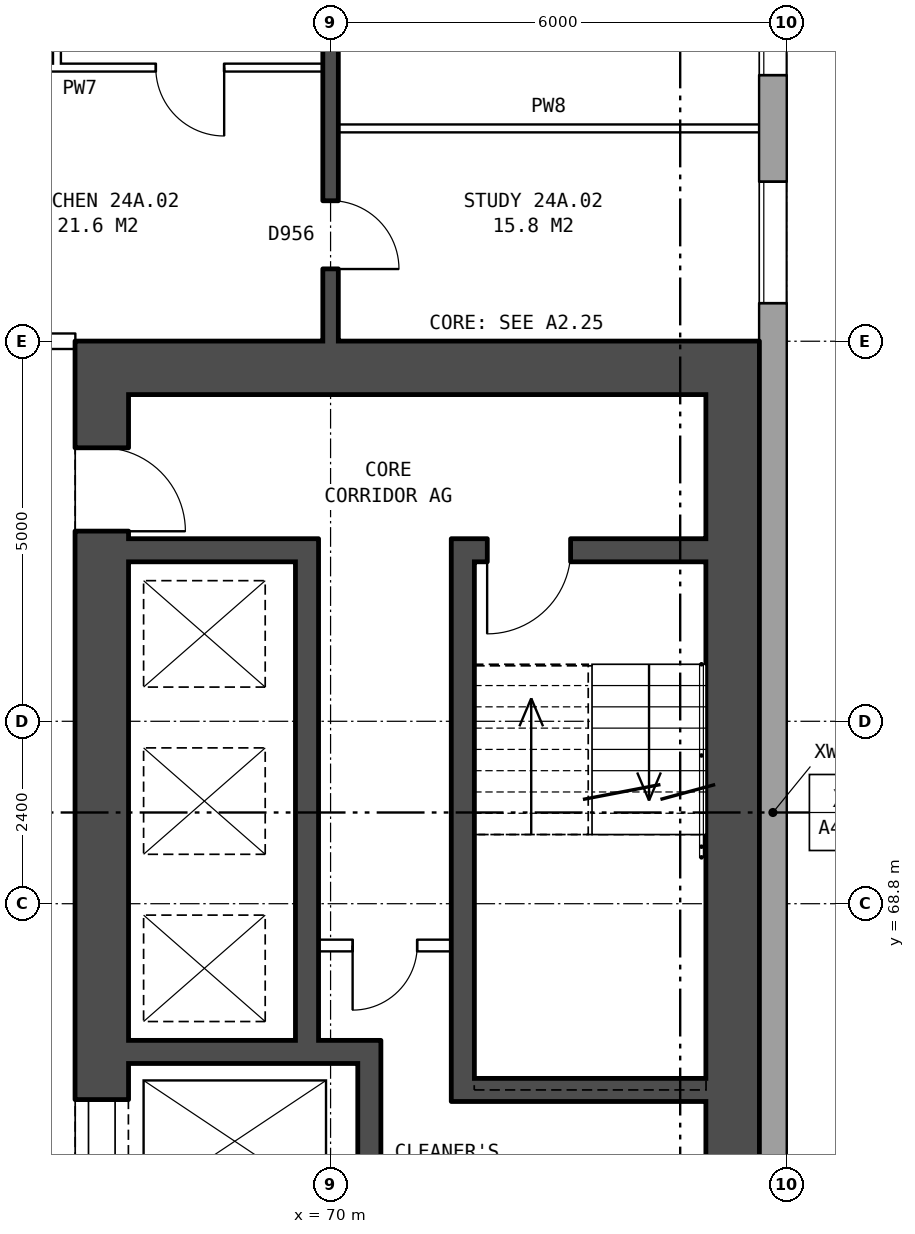
"""IFC4 building model, lengths in metres.
Left out: names, types, materials, properties, quantities, classifications, styles, units other than length and angle.
Written with IfcOpenShell. Run it as: python <this file> out.ifc"""

import sys

from ifc_helpers import new_model, si_unit, direction, frame, frame_2d, origin, place, context, subcontext, project, spatial, rectangle, extrude, element, fill, save


model = new_model("IFC4")
c1 = context("Model", 3, precision=1e-05, world=origin(), true_north=direction((0.0, 1.0)))
c2 = subcontext(c1, "Body", "Model", "MODEL_VIEW")
j1 = project(units=[si_unit("LENGTHUNIT", "METRE"), si_unit("PLANEANGLEUNIT", "RADIAN")], contexts=[c1])
p1 = place(None, origin())
s1 = spatial("IfcSite", under=j1, at=p1, CompositionType="ELEMENT")
p2 = place(p1, origin())
s2 = spatial("IfcBuilding", under=s1, at=p2, CompositionType="ELEMENT")
p3 = place(p2, frame((0.0, 0.0, 87.1)))
s3 = spatial("IfcBuildingStorey", under=s2, at=p3, CompositionType="ELEMENT", Elevation=87.1)
p4 = place(p3, frame((75.82, 57.075, 0.0), z_axis=(0.0, 0.0, 1.0), x_axis=(0.0, 1.0, 0.0)))
e1 = element("IfcWall", 1, at=p4, inside=s3, PredefinedType="STANDARD", context=c2, shape_type="SweptSolid", body=[
    extrude(rectangle(XDim=25.851, YDim=0.36, at=frame_2d((12.925, 0.0))), origin(), (0.0, 0.0, 1.0), 2.85),
])
p5 = place(p4, frame((1.625, 0.0, 0.8)))
e2 = element("IfcOpeningElement", 2, at=p5, cuts=e1, PredefinedType="OPENING", context=c2, shape_type="SweptSolid", body=[
    extrude(rectangle(XDim=1.6, YDim=1.8, at=frame_2d((0.8, 0.9))), frame((0.0, 0.19, 0.0), z_axis=(0.0, -1.0, 0.0), x_axis=(1.0, 0.0, 0.0)), (0.0, 0.0, 1.0), 0.38),
])
p6 = place(p4, frame((4.625, 0.0, 0.8)))
e3 = element("IfcOpeningElement", 3, at=p6, cuts=e1, PredefinedType="OPENING", context=c2, shape_type="SweptSolid", body=[
    extrude(rectangle(XDim=1.6, YDim=1.8, at=frame_2d((0.8, 0.9))), frame((0.0, 0.19, 0.0), z_axis=(0.0, -1.0, 0.0), x_axis=(1.0, 0.0, 0.0)), (0.0, 0.0, 1.0), 0.38),
])
p7 = place(p4, frame((19.625, 0.0, 0.8)))
e4 = element("IfcOpeningElement", 4, at=p7, cuts=e1, PredefinedType="OPENING", context=c2, shape_type="SweptSolid", body=[
    extrude(rectangle(XDim=1.6, YDim=1.8, at=frame_2d((0.8, 0.9))), frame((0.0, 0.19, 0.0), z_axis=(0.0, -1.0, 0.0), x_axis=(1.0, 0.0, 0.0)), (0.0, 0.0, 1.0), 0.38),
])
p8 = place(p4, frame((22.625, 0.0, 0.8)))
e5 = element("IfcOpeningElement", 5, at=p8, cuts=e1, PredefinedType="OPENING", context=c2, shape_type="SweptSolid", body=[
    extrude(rectangle(XDim=1.6, YDim=1.8, at=frame_2d((0.8, 0.9))), frame((0.0, 0.19, 0.0), z_axis=(0.0, -1.0, 0.0), x_axis=(1.0, 0.0, 0.0)), (0.0, 0.0, 1.0), 0.38),
])
p9 = place(p3, frame((66.99, 64.5, 0.0), z_axis=(0.0, 0.0, 1.0), x_axis=(0.0, 1.0, 0.0)))
e6 = element("IfcWall", 6, at=p9, inside=s3, PredefinedType="SHEAR", context=c2, shape_type="SweptSolid", body=[
    extrude(rectangle(XDim=11.0, YDim=0.7, at=frame_2d((5.5, 0.0))), origin(), (0.0, 0.0, 1.0), 2.85),
])
p10 = place(p9, frame((0.625, 0.0, 0.0)))
e7 = element("IfcOpeningElement", 7, at=p10, cuts=e6, PredefinedType="OPENING", context=c2, shape_type="SweptSolid", body=[
    extrude(rectangle(XDim=1.1, YDim=2.1, at=frame_2d((0.55, 1.05))), frame((0.0, 0.36, 0.0), z_axis=(0.0, -1.0, 0.0), x_axis=(1.0, 0.0, 0.0)), (0.0, 0.0, 1.0), 0.72),
])
p11 = place(p9, frame((9.2, 0.0, 0.0)))
e8 = element("IfcOpeningElement", 8, at=p11, cuts=e6, PredefinedType="OPENING", context=c2, shape_type="SweptSolid", body=[
    extrude(rectangle(XDim=1.1, YDim=2.1, at=frame_2d((0.55, 1.05))), frame((0.0, 0.36, 0.0), z_axis=(0.0, -1.0, 0.0), x_axis=(1.0, 0.0, 0.0)), (0.0, 0.0, 1.0), 0.72),
])
p12 = place(p3, frame((75.29, 64.5, 0.0), z_axis=(0.0, 0.0, 1.0), x_axis=(0.0, 1.0, 0.0)))
e9 = element("IfcWall", 9, at=p12, inside=s3, PredefinedType="SHEAR", context=c2, shape_type="SweptSolid", body=[
    extrude(rectangle(XDim=11.0, YDim=0.7, at=frame_2d((5.5, 0.0))), origin(), (0.0, 0.0, 1.0), 2.85),
])
p13 = place(p3, frame((66.64, 75.85, 0.0), z_axis=(0.0, 0.0, 1.0), x_axis=(1.0, 0.0, 0.0)))
e10 = element("IfcWall", 10, at=p13, inside=s3, PredefinedType="SHEAR", context=c2, shape_type="SweptSolid", body=[
    extrude(rectangle(XDim=9.0, YDim=0.7, at=frame_2d((4.5, 0.0))), origin(), (0.0, 0.0, 1.0), 2.85),
])
p14 = place(p3, frame((71.89, 66.35, 0.0), z_axis=(0.0, 0.0, 1.0), x_axis=(1.0, 0.0, 0.0)))
e11 = element("IfcWall", 11, at=p14, inside=s3, PredefinedType="SHEAR", context=c2, shape_type="SweptSolid", body=[
    extrude(rectangle(XDim=3.05, YDim=0.3, at=frame_2d((1.525, 0.0))), origin(), (0.0, 0.0, 1.0), 2.85),
])
p15 = place(p3, frame((67.34, 66.85, 0.0), z_axis=(0.0, 0.0, 1.0), x_axis=(1.0, 0.0, 0.0)))
e12 = element("IfcWall", 12, at=p15, inside=s3, PredefinedType="SHEAR", context=c2, shape_type="SweptSolid", body=[
    extrude(rectangle(XDim=3.32, YDim=0.3, at=frame_2d((1.66, 0.0))), origin(), (0.0, 0.0, 1.0), 2.85),
])
p16 = place(p3, frame((69.84, 68.25, 0.0), z_axis=(0.0, 0.0, 1.0), x_axis=(1.0, 0.0, 0.0)))
e13 = element("IfcWall", 13, at=p16, inside=s3, PredefinedType="PARTITIONING", context=c2, shape_type="SweptSolid", body=[
    extrude(rectangle(XDim=1.75, YDim=0.15, at=frame_2d((0.875, 0.0))), origin(), (0.0, 0.0, 1.0), 2.85),
])
p17 = place(p16, frame((0.45, 0.0, 0.0)))
e14 = element("IfcOpeningElement", 14, at=p17, cuts=e13, PredefinedType="OPENING", context=c2, shape_type="SweptSolid", body=[
    extrude(rectangle(XDim=0.85, YDim=2.1, at=frame_2d((0.425, 1.05))), frame((0.0, 0.085, 0.0), z_axis=(0.0, -1.0, 0.0), x_axis=(1.0, 0.0, 0.0)), (0.0, 0.0, 1.0), 0.17),
])
p18 = place(p3, frame((67.34, 73.45, 0.0), z_axis=(0.0, 0.0, 1.0), x_axis=(1.0, 0.0, 0.0)))
e15 = element("IfcWall", 15, at=p18, inside=s3, PredefinedType="SHEAR", context=c2, shape_type="SweptSolid", body=[
    extrude(rectangle(XDim=2.2, YDim=0.3, at=frame_2d((1.1, 0.0))), origin(), (0.0, 0.0, 1.0), 2.85),
])
p19 = place(p3, frame((71.89, 73.45, 0.0), z_axis=(0.0, 0.0, 1.0), x_axis=(1.0, 0.0, 0.0)))
e16 = element("IfcWall", 16, at=p19, inside=s3, PredefinedType="SHEAR", context=c2, shape_type="SweptSolid", body=[
    extrude(rectangle(XDim=3.05, YDim=0.3, at=frame_2d((1.525, 0.0))), origin(), (0.0, 0.0, 1.0), 2.85),
])
p20 = place(p19, frame((0.17, 0.0, 0.0)))
e17 = element("IfcOpeningElement", 17, at=p20, cuts=e16, PredefinedType="OPENING", context=c2, shape_type="SweptSolid", body=[
    extrude(rectangle(XDim=1.1, YDim=2.1, at=frame_2d((0.55, 1.05))), frame((0.0, 0.16, 0.0), z_axis=(0.0, -1.0, 0.0), x_axis=(1.0, 0.0, 0.0)), (0.0, 0.0, 1.0), 0.32),
])
p21 = place(p3, frame((69.69, 67.0, 0.0), z_axis=(0.0, 0.0, 1.0), x_axis=(0.0, 1.0, 0.0)))
e18 = element("IfcWall", 18, at=p21, inside=s3, PredefinedType="SHEAR", context=c2, shape_type="SweptSolid", body=[
    extrude(rectangle(XDim=6.6, YDim=0.3, at=frame_2d((3.3, 0.0))), origin(), (0.0, 0.0, 1.0), 2.85),
])
p22 = place(p3, frame((70.51, 64.5, 0.0), z_axis=(0.0, 0.0, 1.0), x_axis=(0.0, 1.0, 0.0)))
e19 = element("IfcWall", 19, at=p22, inside=s3, PredefinedType="SHEAR", context=c2, shape_type="SweptSolid", body=[
    extrude(rectangle(XDim=2.2, YDim=0.3, at=frame_2d((1.1, 0.0))), origin(), (0.0, 0.0, 1.0), 2.85),
])
p23 = place(p3, frame((71.74, 66.2, 0.0), z_axis=(0.0, 0.0, 1.0), x_axis=(0.0, 1.0, 0.0)))
e20 = element("IfcWall", 20, at=p23, inside=s3, PredefinedType="SHEAR", context=c2, shape_type="SweptSolid", body=[
    extrude(rectangle(XDim=7.4, YDim=0.3, at=frame_2d((3.7, 0.0))), origin(), (0.0, 0.0, 1.0), 2.85),
])
p24 = place(p3, frame((63.64, 76.2, 0.0), z_axis=(0.0, 0.0, 1.0), x_axis=(1.0, 0.0, 0.0)))
e21 = element("IfcWall", 21, at=p24, inside=s3, PredefinedType="PARTITIONING", context=c2, shape_type="SweptSolid", body=[
    extrude(rectangle(XDim=3.0, YDim=0.2, at=frame_2d((1.5, 0.0))), origin(), (0.0, 0.0, 1.0), 2.85),
])
p25 = place(p24, frame((1.18, 0.0, 0.0)))
e22 = element("IfcOpeningElement", 22, at=p25, cuts=e21, PredefinedType="OPENING", context=c2, shape_type="SweptSolid", body=[
    extrude(rectangle(XDim=1.0, YDim=2.1, at=frame_2d((0.5, 1.05))), frame((0.0, 0.11, 0.0), z_axis=(0.0, -1.0, 0.0), x_axis=(1.0, 0.0, 0.0)), (0.0, 0.0, 1.0), 0.22),
])
p26 = place(p3, frame((70.1, 79.0, 0.0), z_axis=(0.0, 0.0, 1.0), x_axis=(1.0, 0.0, 0.0)))
e23 = element("IfcWall", 23, at=p26, inside=s3, PredefinedType="PARTITIONING", context=c2, shape_type="SweptSolid", body=[
    extrude(rectangle(XDim=5.54, YDim=0.1, at=frame_2d((2.77, 0.0))), origin(), (0.0, 0.0, 1.0), 2.85),
])
p27 = place(p3, frame((64.1, 79.8, 0.0), z_axis=(0.0, 0.0, 1.0), x_axis=(1.0, 0.0, 0.0)))
e24 = element("IfcWall", 24, at=p27, inside=s3, PredefinedType="PARTITIONING", context=c2, shape_type="SweptSolid", body=[
    extrude(rectangle(XDim=5.8, YDim=0.1, at=frame_2d((2.9, 0.0))), origin(), (0.0, 0.0, 1.0), 2.85),
])
p28 = place(p27, frame((3.6, 0.0, 0.0)))
e25 = element("IfcOpeningElement", 25, at=p28, cuts=e24, PredefinedType="OPENING", context=c2, shape_type="SweptSolid", body=[
    extrude(rectangle(XDim=0.9, YDim=2.1, at=frame_2d((0.45, 1.05))), frame((0.0, 0.06, 0.0), z_axis=(0.0, -1.0, 0.0), x_axis=(1.0, 0.0, 0.0)), (0.0, 0.0, 1.0), 0.12),
])
p29 = place(p27, frame((0.7, 0.0, 0.0)))
e26 = element("IfcOpeningElement", 26, at=p29, cuts=e24, PredefinedType="OPENING", context=c2, shape_type="SweptSolid", body=[
    extrude(rectangle(XDim=0.9, YDim=2.1, at=frame_2d((0.45, 1.05))), frame((0.0, 0.06, 0.0), z_axis=(0.0, -1.0, 0.0), x_axis=(1.0, 0.0, 0.0)), (0.0, 0.0, 1.0), 0.12),
])
p30 = place(p3, frame((66.4, 79.85, 0.0), z_axis=(0.0, 0.0, 1.0), x_axis=(0.0, 1.0, 0.0)))
e27 = element("IfcWall", 27, at=p30, inside=s3, PredefinedType="PARTITIONING", context=c2, shape_type="SweptSolid", body=[
    extrude(rectangle(XDim=2.3, YDim=0.1, at=frame_2d((1.15, 0.0))), origin(), (0.0, 0.0, 1.0), 2.85),
])
p31 = place(p3, frame((70.0, 76.2, 0.0), z_axis=(0.0, 0.0, 1.0), x_axis=(0.0, 1.0, 0.0)))
e28 = element("IfcWall", 28, at=p31, inside=s3, PredefinedType="SOLIDWALL", context=c2, shape_type="SweptSolid", body=[
    extrude(rectangle(XDim=9.44, YDim=0.2, at=frame_2d((4.72, 0.0))), origin(), (0.0, 0.0, 1.0), 2.85),
])
p32 = place(p31, frame((6.07, 0.0, 0.0)))
e29 = element("IfcOpeningElement", 29, at=p32, cuts=e28, PredefinedType="OPENING", context=c2, shape_type="SweptSolid", body=[
    extrude(rectangle(XDim=0.9, YDim=2.1, at=frame_2d((0.45, 1.05))), frame((0.0, 0.11, 0.0), z_axis=(0.0, -1.0, 0.0), x_axis=(1.0, 0.0, 0.0)), (0.0, 0.0, 1.0), 0.22),
])
p33 = place(p31, frame((0.95, 0.0, 0.0)))
e30 = element("IfcOpeningElement", 30, at=p33, cuts=e28, PredefinedType="OPENING", context=c2, shape_type="SweptSolid", body=[
    extrude(rectangle(XDim=0.9, YDim=2.1, at=frame_2d((0.45, 1.05))), frame((0.0, 0.11, 0.0), z_axis=(0.0, -1.0, 0.0), x_axis=(1.0, 0.0, 0.0)), (0.0, 0.0, 1.0), 0.22),
])
p34 = place(p7, origin())
e31 = element("IfcWindow", 31, at=p34, inside=s3, PartitioningType="SINGLE_PANEL", PredefinedType="WINDOW", context=c2, shape_type="SweptSolid", body=[
    extrude(rectangle(XDim=1.6, YDim=1.8, at=frame_2d((0.8, 0.9))), frame((0.0, 0.15, 0.0), z_axis=(0.0, -1.0, 0.0), x_axis=(1.0, 0.0, 0.0)), (0.0, 0.0, 1.0), 0.06),
])
fill(e4, e31)
p35 = place(p8, origin())
e32 = element("IfcWindow", 32, at=p35, inside=s3, PartitioningType="SINGLE_PANEL", PredefinedType="WINDOW", context=c2, shape_type="SweptSolid", body=[
    extrude(rectangle(XDim=1.6, YDim=1.8, at=frame_2d((0.8, 0.9))), frame((0.0, 0.15, 0.0), z_axis=(0.0, -1.0, 0.0), x_axis=(1.0, 0.0, 0.0)), (0.0, 0.0, 1.0), 0.06),
])
fill(e5, e32)
p36 = place(p10, origin())
e33 = element("IfcDoor", 33, at=p36, inside=s3, OperationType="DOUBLE_DOOR_SLIDING", PredefinedType="DOOR", context=c2, shape_type="SweptSolid", body=[
    extrude(rectangle(XDim=1.1, YDim=2.1, at=frame_2d((0.55, 1.05))), frame((0.0, -0.285, 0.0), z_axis=(0.0, -1.0, 0.0), x_axis=(1.0, 0.0, 0.0)), (0.0, 0.0, 1.0), 0.05),
])
fill(e7, e33)
p37 = place(p11, frame((1.1, 0.0, 0.0), z_axis=(0.0, 0.0, 1.0), x_axis=(-1.0, 0.0, 0.0)))
e34 = element("IfcDoor", 34, at=p37, inside=s3, OperationType="SINGLE_SWING_RIGHT", PredefinedType="DOOR", context=c2, shape_type="SweptSolid", body=[
    extrude(rectangle(XDim=1.1, YDim=2.1, at=frame_2d((0.55, 1.05))), frame((0.0, 0.335, 0.0), z_axis=(0.0, -1.0, 0.0), x_axis=(1.0, 0.0, 0.0)), (0.0, 0.0, 1.0), 0.05),
])
fill(e8, e34)
p38 = place(p20, frame((1.1, 0.0, 0.0), z_axis=(0.0, 0.0, 1.0), x_axis=(-1.0, 0.0, 0.0)))
e35 = element("IfcDoor", 35, at=p38, inside=s3, OperationType="SINGLE_SWING_RIGHT", PredefinedType="DOOR", context=c2, shape_type="SweptSolid", body=[
    extrude(rectangle(XDim=1.1, YDim=2.1, at=frame_2d((0.55, 1.05))), frame((0.0, 0.025, 0.0), z_axis=(0.0, -1.0, 0.0), x_axis=(1.0, 0.0, 0.0)), (0.0, 0.0, 1.0), 0.05),
])
fill(e17, e35)
p39 = place(p17, frame((0.85, 0.0, 0.0), z_axis=(0.0, 0.0, 1.0), x_axis=(-1.0, 0.0, 0.0)))
e36 = element("IfcDoor", 36, at=p39, inside=s3, OperationType="SINGLE_SWING_RIGHT", PredefinedType="DOOR", context=c2, shape_type="SweptSolid", body=[
    extrude(rectangle(XDim=0.85, YDim=2.1, at=frame_2d((0.425, 1.05))), frame((0.0, 0.025, 0.0), z_axis=(0.0, -1.0, 0.0), x_axis=(1.0, 0.0, 0.0)), (0.0, 0.0, 1.0), 0.05),
])
fill(e14, e36)
p40 = place(p33, frame((0.9, 0.0, 0.0), z_axis=(0.0, 0.0, 1.0), x_axis=(-1.0, 0.0, 0.0)))
e37 = element("IfcDoor", 37, at=p40, inside=s3, OperationType="SINGLE_SWING_RIGHT", PredefinedType="DOOR", context=c2, shape_type="SweptSolid", body=[
    extrude(rectangle(XDim=0.9, YDim=2.1, at=frame_2d((0.45, 1.05))), frame((0.0, 0.025, 0.0), z_axis=(0.0, -1.0, 0.0), x_axis=(1.0, 0.0, 0.0)), (0.0, 0.0, 1.0), 0.05),
])
fill(e30, e37)
p41 = place(p28, frame((0.9, 0.0, 0.0), z_axis=(0.0, 0.0, 1.0), x_axis=(-1.0, 0.0, 0.0)))
e38 = element("IfcDoor", 38, at=p41, inside=s3, OperationType="SINGLE_SWING_LEFT", PredefinedType="DOOR", context=c2, shape_type="SweptSolid", body=[
    extrude(rectangle(XDim=0.9, YDim=2.1, at=frame_2d((0.45, 1.05))), frame((0.0, 0.025, 0.0), z_axis=(0.0, -1.0, 0.0), x_axis=(1.0, 0.0, 0.0)), (0.0, 0.0, 1.0), 0.05),
])
fill(e25, e38)
save(model, sys.argv[1])
